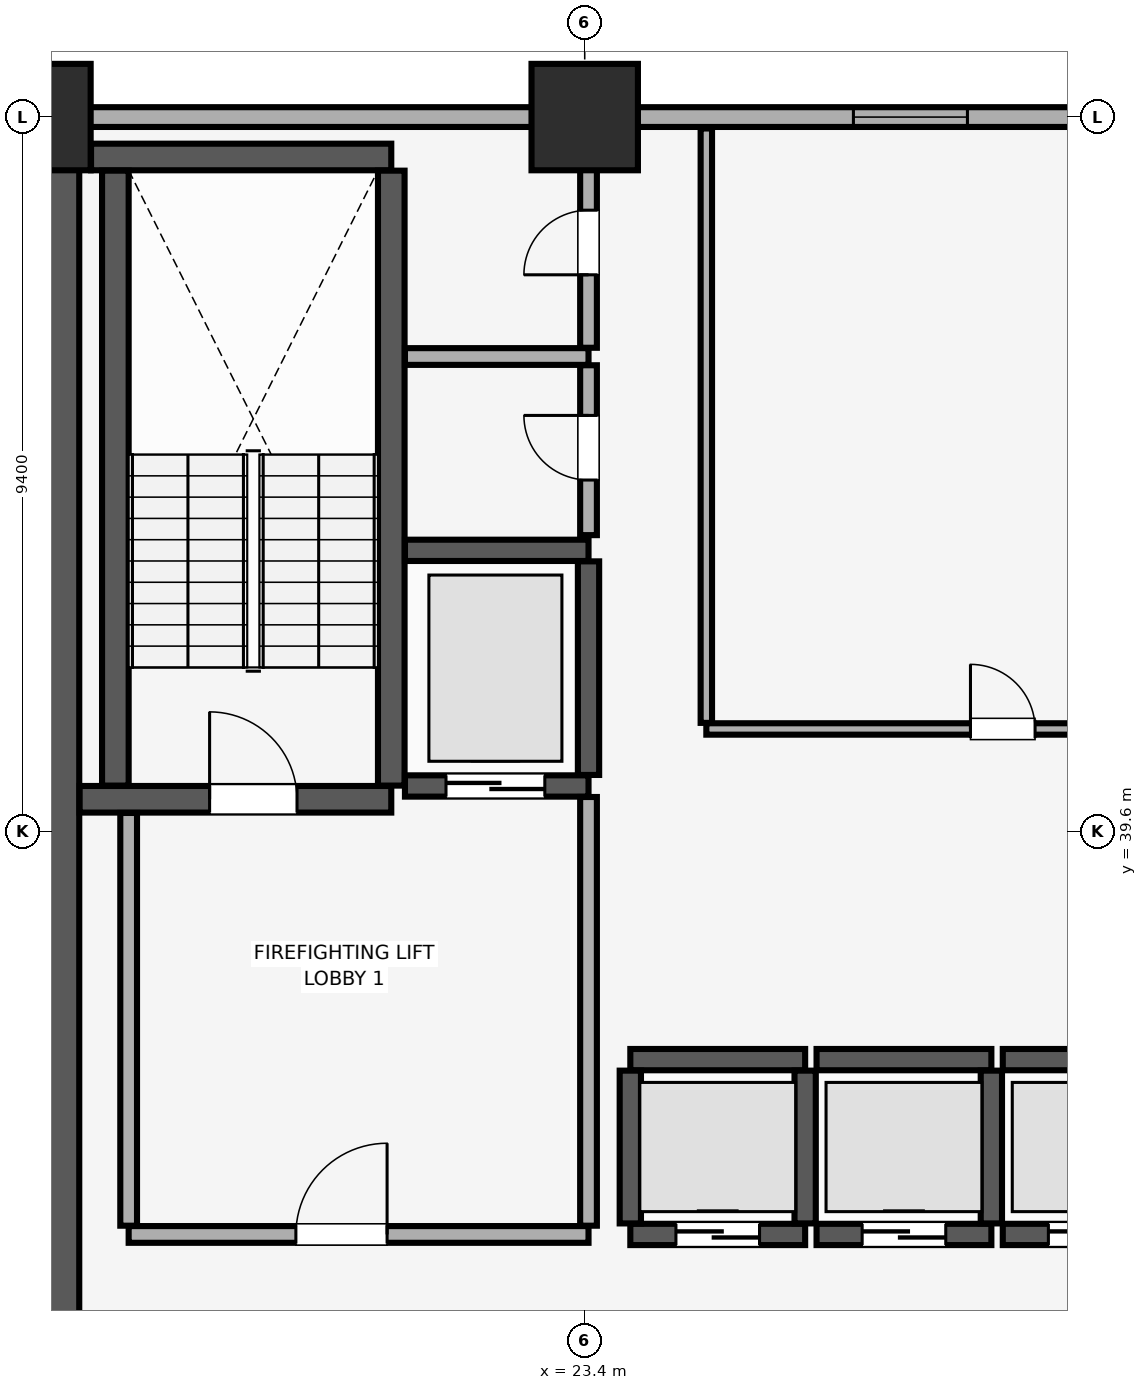
"""IFC4 building model, lengths in metres.
Left out: names, types, materials, properties, quantities, classifications, styles, units other than length and angle.
Written with IfcOpenShell. Run it as: python <this file> out.ifc"""

import sys

from ifc_helpers import new_model, si_unit, direction, frame, frame_2d, origin, origin_2d, place, context, subcontext, project, spatial, rectangle, extrude, element, fill, save


model = new_model("IFC4")
c1 = context("Model", 3, precision=1e-05, world=origin(), true_north=direction((0.0, 1.0)))
c2 = subcontext(c1, "Body", "Model", "MODEL_VIEW")
j1 = project(units=[si_unit("LENGTHUNIT", "METRE"), si_unit("PLANEANGLEUNIT", "RADIAN")], contexts=[c1])
p1 = place(None, origin())
s1 = spatial("IfcSite", under=j1, at=p1, CompositionType="ELEMENT")
p2 = place(p1, origin())
s2 = spatial("IfcBuilding", under=s1, at=p2, CompositionType="ELEMENT")
p3 = place(p2, frame((0.0, 0.0, 72.65)))
s3 = spatial("IfcBuildingStorey", under=s2, at=p3, CompositionType="ELEMENT", Elevation=72.65)
for number, where, z_axis, x_axis in (
    (1, (16.2, 49.0, 0.0), (0.0, 0.0, 1.0), (1.0, 0.0, 0.0)),
    (2, (23.4, 49.0, 0.0), (0.0, 0.0, 1.0), (1.0, 0.0, 0.0)),
):
    element("IfcColumn", number, at=place(p3, frame(where, z_axis=z_axis, x_axis=x_axis)), inside=s3, PredefinedType="COLUMN", context=c2, shape_type="SweptSolid", body=[
        extrude(rectangle(XDim=1.4, YDim=1.4, at=origin_2d()), origin(), (0.0, 0.0, 1.0), 3.51),
    ])
p4 = place(p3, frame((79.8, 49.0, 0.0), z_axis=(0.0, 0.0, 1.0), x_axis=(-1.0, 0.0, 0.0)))
e3 = element("IfcWall", 3, at=p4, inside=s3, PredefinedType="SOLIDWALL", context=c2, shape_type="SweptSolid", body=[
    extrude(rectangle(XDim=75.6, YDim=0.26, at=frame_2d((37.8, 0.0))), origin(), (0.0, 0.0, 1.0), 2.56),
])
p5 = place(p4, frame((72.565, 0.0, 0.85)))
e4 = element("IfcOpeningElement", 4, at=p5, cuts=e3, PredefinedType="OPENING", context=c2, shape_type="SweptSolid", body=[
    extrude(rectangle(XDim=1.5, YDim=1.4, at=frame_2d((0.75, 0.7))), frame((0.0, 0.14, 0.0), z_axis=(0.0, -1.0, 0.0), x_axis=(1.0, 0.0, 0.0)), (0.0, 0.0, 1.0), 0.28),
])
p6 = place(p4, frame((67.45, 0.0, 0.85)))
e5 = element("IfcOpeningElement", 5, at=p6, cuts=e3, PredefinedType="OPENING", context=c2, shape_type="SweptSolid", body=[
    extrude(rectangle(XDim=1.5, YDim=1.4, at=frame_2d((0.75, 0.7))), frame((0.0, 0.14, 0.0), z_axis=(0.0, -1.0, 0.0), x_axis=(1.0, 0.0, 0.0)), (0.0, 0.0, 1.0), 0.28),
])
p7 = place(p4, frame((6.65, 0.0, 0.85)))
e6 = element("IfcOpeningElement", 6, at=p7, cuts=e3, PredefinedType="OPENING", context=c2, shape_type="SweptSolid", body=[
    extrude(rectangle(XDim=1.5, YDim=1.4, at=frame_2d((0.75, 0.7))), frame((0.0, 0.14, 0.0), z_axis=(0.0, -1.0, 0.0), x_axis=(1.0, 0.0, 0.0)), (0.0, 0.0, 1.0), 0.28),
])
p8 = place(p4, frame((1.535, 0.0, 0.85)))
e7 = element("IfcOpeningElement", 7, at=p8, cuts=e3, PredefinedType="OPENING", context=c2, shape_type="SweptSolid", body=[
    extrude(rectangle(XDim=1.5, YDim=1.4, at=frame_2d((0.75, 0.7))), frame((0.0, 0.14, 0.0), z_axis=(0.0, -1.0, 0.0), x_axis=(1.0, 0.0, 0.0)), (0.0, 0.0, 1.0), 0.28),
])
p9 = place(p4, frame((51.365, 0.0, 0.9)))
e8 = element("IfcOpeningElement", 8, at=p9, cuts=e3, PredefinedType="OPENING", context=c2, shape_type="SweptSolid", body=[
    extrude(rectangle(XDim=1.5, YDim=1.4, at=frame_2d((0.75, 0.7))), frame((0.0, 0.14, 0.0), z_axis=(0.0, -1.0, 0.0), x_axis=(1.0, 0.0, 0.0)), (0.0, 0.0, 1.0), 0.28),
])
p10 = place(p4, frame((44.55, 0.0, 0.9)))
e9 = element("IfcOpeningElement", 9, at=p10, cuts=e3, PredefinedType="OPENING", context=c2, shape_type="SweptSolid", body=[
    extrude(rectangle(XDim=1.5, YDim=1.4, at=frame_2d((0.75, 0.7))), frame((0.0, 0.14, 0.0), z_axis=(0.0, -1.0, 0.0), x_axis=(1.0, 0.0, 0.0)), (0.0, 0.0, 1.0), 0.28),
])
p11 = place(p4, frame((28.1, 0.0, 0.9)))
e10 = element("IfcOpeningElement", 10, at=p11, cuts=e3, PredefinedType="OPENING", context=c2, shape_type="SweptSolid", body=[
    extrude(rectangle(XDim=1.5, YDim=1.4, at=frame_2d((0.75, 0.7))), frame((0.0, 0.14, 0.0), z_axis=(0.0, -1.0, 0.0), x_axis=(1.0, 0.0, 0.0)), (0.0, 0.0, 1.0), 0.28),
])
p12 = place(p4, frame((23.485, 0.0, 0.9)))
e11 = element("IfcOpeningElement", 11, at=p12, cuts=e3, PredefinedType="OPENING", context=c2, shape_type="SweptSolid", body=[
    extrude(rectangle(XDim=1.5, YDim=1.4, at=frame_2d((0.75, 0.7))), frame((0.0, 0.14, 0.0), z_axis=(0.0, -1.0, 0.0), x_axis=(1.0, 0.0, 0.0)), (0.0, 0.0, 1.0), 0.28),
])
p13 = place(p3, frame((16.2, 29.4, 0.0), z_axis=(0.0, 0.0, 1.0), x_axis=(0.0, 1.0, 0.0)))
e12 = element("IfcWall", 12, at=p13, inside=s3, PredefinedType="SHEAR", context=c2, shape_type="SweptSolid", body=[
    extrude(rectangle(XDim=19.2, YDim=1.1, at=frame_2d((9.6, 0.0))), origin(), (0.0, 0.0, 1.0), 3.51),
])
p14 = place(p3, frame((16.755, 40.025, 0.0), z_axis=(0.0, 0.0, 1.0), x_axis=(1.0, 0.0, 0.0)))
e13 = element("IfcWall", 13, at=p14, inside=s3, PredefinedType="SHEAR", context=c2, shape_type="SweptSolid", body=[
    extrude(rectangle(XDim=4.1, YDim=0.35, at=frame_2d((2.05, 0.0))), origin(), (0.0, 0.0, 1.0), 3.51),
])
p15 = place(p14, frame((1.71, 0.0, 0.0)))
e14 = element("IfcOpeningElement", 14, at=p15, cuts=e13, PredefinedType="OPENING", context=c2, shape_type="SweptSolid", body=[
    extrude(rectangle(XDim=1.15, YDim=2.15, at=frame_2d((0.575, 1.075))), frame((0.0, 0.185, 0.0), z_axis=(0.0, -1.0, 0.0), x_axis=(1.0, 0.0, 0.0)), (0.0, 0.0, 1.0), 0.37),
])
p16 = place(p3, frame((16.905, 48.475, 0.0), z_axis=(0.0, 0.0, 1.0), x_axis=(1.0, 0.0, 0.0)))
e15 = element("IfcWall", 15, at=p16, inside=s3, PredefinedType="SHEAR", context=c2, shape_type="SweptSolid", body=[
    extrude(rectangle(XDim=3.95, YDim=0.35, at=frame_2d((1.975, 0.0))), origin(), (0.0, 0.0, 1.0), 3.51),
])
for number, where, z_axis, x_axis in (
    (16, (17.225, 40.205, 0.0), (0.0, 0.0, 1.0), (0.0, 1.0, 0.0)),
    (17, (20.855, 40.205, 0.0), (0.0, 0.0, 1.0), (0.0, 1.0, 0.0)),
):
    element("IfcWall", number, at=place(p3, frame(where, z_axis=z_axis, x_axis=x_axis)), inside=s3, PredefinedType="SHEAR", context=c2, shape_type="SweptSolid", body=[
        extrude(rectangle(XDim=8.09, YDim=0.35, at=frame_2d((4.045, 0.0))), origin(), (0.0, 0.0, 1.0), 3.51),
    ])
p17 = place(p3, frame((24.0, 34.3, 0.0), z_axis=(0.0, 0.0, 1.0), x_axis=(1.0, 0.0, 0.0)))
e18 = element("IfcWall", 18, at=p17, inside=s3, PredefinedType="SHEAR", context=c2, shape_type="SweptSolid", body=[
    extrude(rectangle(XDim=2.3, YDim=0.28, at=frame_2d((1.15, 0.0))), origin(), (0.0, 0.0, 1.0), 3.51),
])
p18 = place(p17, frame((0.6, 0.0, 0.0)))
e19 = element("IfcOpeningElement", 19, at=p18, cuts=e18, PredefinedType="OPENING", context=c2, shape_type="SweptSolid", body=[
    extrude(rectangle(XDim=1.1, YDim=2.2, at=frame_2d((0.55, 1.1))), frame((0.0, 0.15, 0.0), z_axis=(0.0, -1.0, 0.0), x_axis=(1.0, 0.0, 0.0)), (0.0, 0.0, 1.0), 0.3),
])
p19 = place(p3, frame((24.0, 36.6, 0.0), z_axis=(0.0, 0.0, 1.0), x_axis=(1.0, 0.0, 0.0)))
e20 = element("IfcWall", 20, at=p19, inside=s3, PredefinedType="SHEAR", context=c2, shape_type="SweptSolid", body=[
    extrude(rectangle(XDim=2.3, YDim=0.28, at=frame_2d((1.15, 0.0))), origin(), (0.0, 0.0, 1.0), 3.51),
])
for number, where, z_axis, x_axis in (
    (21, (24.0, 34.445, 0.0), (0.0, 0.0, 1.0), (0.0, 1.0, 0.0)),
    (22, (26.3, 34.445, 0.0), (0.0, 0.0, 1.0), (0.0, 1.0, 0.0)),
):
    element("IfcWall", number, at=place(p3, frame(where, z_axis=z_axis, x_axis=x_axis)), inside=s3, PredefinedType="SHEAR", context=c2, shape_type="SweptSolid", body=[
        extrude(rectangle(XDim=2.01, YDim=0.28, at=frame_2d((1.005, 0.0))), origin(), (0.0, 0.0, 1.0), 3.51),
    ])
p20 = place(p3, frame((26.45, 34.3, 0.0), z_axis=(0.0, 0.0, 1.0), x_axis=(1.0, 0.0, 0.0)))
e23 = element("IfcWall", 23, at=p20, inside=s3, PredefinedType="SHEAR", context=c2, shape_type="SweptSolid", body=[
    extrude(rectangle(XDim=2.3, YDim=0.28, at=frame_2d((1.15, 0.0))), origin(), (0.0, 0.0, 1.0), 3.51),
])
p21 = place(p20, frame((0.6, 0.0, 0.0)))
e24 = element("IfcOpeningElement", 24, at=p21, cuts=e23, PredefinedType="OPENING", context=c2, shape_type="SweptSolid", body=[
    extrude(rectangle(XDim=1.1, YDim=2.2, at=frame_2d((0.55, 1.1))), frame((0.0, 0.15, 0.0), z_axis=(0.0, -1.0, 0.0), x_axis=(1.0, 0.0, 0.0)), (0.0, 0.0, 1.0), 0.3),
])
p22 = place(p3, frame((26.45, 36.6, 0.0), z_axis=(0.0, 0.0, 1.0), x_axis=(1.0, 0.0, 0.0)))
e25 = element("IfcWall", 25, at=p22, inside=s3, PredefinedType="SHEAR", context=c2, shape_type="SweptSolid", body=[
    extrude(rectangle(XDim=2.3, YDim=0.28, at=frame_2d((1.15, 0.0))), origin(), (0.0, 0.0, 1.0), 3.51),
])
p23 = place(p3, frame((28.75, 34.445, 0.0), z_axis=(0.0, 0.0, 1.0), x_axis=(0.0, 1.0, 0.0)))
e26 = element("IfcWall", 26, at=p23, inside=s3, PredefinedType="SHEAR", context=c2, shape_type="SweptSolid", body=[
    extrude(rectangle(XDim=2.01, YDim=0.28, at=frame_2d((1.005, 0.0))), origin(), (0.0, 0.0, 1.0), 3.51),
])
p24 = place(p3, frame((28.9, 34.3, 0.0), z_axis=(0.0, 0.0, 1.0), x_axis=(1.0, 0.0, 0.0)))
e27 = element("IfcWall", 27, at=p24, inside=s3, PredefinedType="SHEAR", context=c2, shape_type="SweptSolid", body=[
    extrude(rectangle(XDim=2.3, YDim=0.28, at=frame_2d((1.15, 0.0))), origin(), (0.0, 0.0, 1.0), 3.51),
])
p25 = place(p24, frame((0.6, 0.0, 0.0)))
e28 = element("IfcOpeningElement", 28, at=p25, cuts=e27, PredefinedType="OPENING", context=c2, shape_type="SweptSolid", body=[
    extrude(rectangle(XDim=1.1, YDim=2.2, at=frame_2d((0.55, 1.1))), frame((0.0, 0.15, 0.0), z_axis=(0.0, -1.0, 0.0), x_axis=(1.0, 0.0, 0.0)), (0.0, 0.0, 1.0), 0.3),
])
p26 = place(p3, frame((28.9, 36.6, 0.0), z_axis=(0.0, 0.0, 1.0), x_axis=(1.0, 0.0, 0.0)))
e29 = element("IfcWall", 29, at=p26, inside=s3, PredefinedType="SHEAR", context=c2, shape_type="SweptSolid", body=[
    extrude(rectangle(XDim=2.3, YDim=0.28, at=frame_2d((1.15, 0.0))), origin(), (0.0, 0.0, 1.0), 3.51),
])
p27 = place(p3, frame((21.035, 40.2, 0.0), z_axis=(0.0, 0.0, 1.0), x_axis=(1.0, 0.0, 0.0)))
e30 = element("IfcWall", 30, at=p27, inside=s3, PredefinedType="SHEAR", context=c2, shape_type="SweptSolid", body=[
    extrude(rectangle(XDim=2.415, YDim=0.28, at=frame_2d((1.208, 0.0))), origin(), (0.0, 0.0, 1.0), 3.51),
])
p28 = place(p27, frame((0.54, 0.0, 0.0)))
e31 = element("IfcOpeningElement", 31, at=p28, cuts=e30, PredefinedType="OPENING", context=c2, shape_type="SweptSolid", body=[
    extrude(rectangle(XDim=1.3, YDim=2.3, at=frame_2d((0.65, 1.15))), frame((0.0, 0.15, 0.0), z_axis=(0.0, -1.0, 0.0), x_axis=(1.0, 0.0, 0.0)), (0.0, 0.0, 1.0), 0.3),
])
p29 = place(p3, frame((21.035, 43.3, 0.0), z_axis=(0.0, 0.0, 1.0), x_axis=(1.0, 0.0, 0.0)))
e32 = element("IfcWall", 32, at=p29, inside=s3, PredefinedType="SHEAR", context=c2, shape_type="SweptSolid", body=[
    extrude(rectangle(XDim=2.415, YDim=0.28, at=frame_2d((1.208, 0.0))), origin(), (0.0, 0.0, 1.0), 3.51),
])
p30 = place(p3, frame((23.45, 40.345, 0.0), z_axis=(0.0, 0.0, 1.0), x_axis=(0.0, 1.0, 0.0)))
e33 = element("IfcWall", 33, at=p30, inside=s3, PredefinedType="SHEAR", context=c2, shape_type="SweptSolid", body=[
    extrude(rectangle(XDim=2.81, YDim=0.28, at=frame_2d((1.405, 0.0))), origin(), (0.0, 0.0, 1.0), 3.51),
])
p31 = place(p3, frame((17.4, 34.3, 0.0), z_axis=(0.0, 0.0, 1.0), x_axis=(1.0, 0.0, 0.0)))
e34 = element("IfcWall", 34, at=p31, inside=s3, PredefinedType="PARTITIONING", context=c2, shape_type="SweptSolid", body=[
    extrude(rectangle(XDim=6.05, YDim=0.22, at=frame_2d((3.025, 0.0))), origin(), (0.0, 0.0, 1.0), 3.51),
])
p32 = place(p31, frame((2.2, 0.0, 0.0)))
e35 = element("IfcOpeningElement", 35, at=p32, cuts=e34, PredefinedType="OPENING", context=c2, shape_type="SweptSolid", body=[
    extrude(rectangle(XDim=1.2, YDim=2.15, at=frame_2d((0.6, 1.075))), frame((0.0, 0.12, 0.0), z_axis=(0.0, -1.0, 0.0), x_axis=(1.0, 0.0, 0.0)), (0.0, 0.0, 1.0), 0.24),
])
p33 = place(p3, frame((17.4, 34.415, 0.0), z_axis=(0.0, 0.0, 1.0), x_axis=(0.0, 1.0, 0.0)))
e36 = element("IfcWall", 36, at=p33, inside=s3, PredefinedType="PARTITIONING", context=c2, shape_type="SweptSolid", body=[
    extrude(rectangle(XDim=5.43, YDim=0.22, at=frame_2d((2.715, 0.0))), origin(), (0.0, 0.0, 1.0), 3.51),
])
p34 = place(p3, frame((23.45, 34.415, 0.0), z_axis=(0.0, 0.0, 1.0), x_axis=(0.0, 1.0, 0.0)))
e37 = element("IfcWall", 37, at=p34, inside=s3, PredefinedType="PARTITIONING", context=c2, shape_type="SweptSolid", body=[
    extrude(rectangle(XDim=5.64, YDim=0.22, at=frame_2d((2.82, 0.0))), origin(), (0.0, 0.0, 1.0), 3.51),
])
p35 = place(p3, frame((21.035, 45.85, 0.0), z_axis=(0.0, 0.0, 1.0), x_axis=(1.0, 0.0, 0.0)))
e38 = element("IfcWall", 38, at=p35, inside=s3, PredefinedType="PARTITIONING", context=c2, shape_type="SweptSolid", body=[
    extrude(rectangle(XDim=2.415, YDim=0.22, at=frame_2d((1.208, 0.0))), origin(), (0.0, 0.0, 1.0), 3.51),
])
p36 = place(p3, frame((23.45, 43.5, 0.0), z_axis=(0.0, 0.0, 1.0), x_axis=(0.0, 1.0, 0.0)))
e39 = element("IfcWall", 39, at=p36, inside=s3, PredefinedType="PARTITIONING", context=c2, shape_type="SweptSolid", body=[
    extrude(rectangle(XDim=2.235, YDim=0.22, at=frame_2d((1.118, 0.0))), origin(), (0.0, 0.0, 1.0), 3.51),
])
p37 = place(p36, frame((0.725, 0.0, 0.0)))
e40 = element("IfcOpeningElement", 40, at=p37, cuts=e39, PredefinedType="OPENING", context=c2, shape_type="SweptSolid", body=[
    extrude(rectangle(XDim=0.85, YDim=2.1, at=frame_2d((0.425, 1.05))), frame((0.0, 0.12, 0.0), z_axis=(0.0, -1.0, 0.0), x_axis=(1.0, 0.0, 0.0)), (0.0, 0.0, 1.0), 0.24),
])
p38 = place(p3, frame((23.45, 45.965, 0.0), z_axis=(0.0, 0.0, 1.0), x_axis=(0.0, 1.0, 0.0)))
e41 = element("IfcWall", 41, at=p38, inside=s3, PredefinedType="PARTITIONING", context=c2, shape_type="SweptSolid", body=[
    extrude(rectangle(XDim=2.885, YDim=0.22, at=frame_2d((1.442, 0.0))), origin(), (0.0, 0.0, 1.0), 3.51),
])
p39 = place(p38, frame((0.96, 0.0, 0.0)))
e42 = element("IfcOpeningElement", 42, at=p39, cuts=e41, PredefinedType="OPENING", context=c2, shape_type="SweptSolid", body=[
    extrude(rectangle(XDim=0.85, YDim=2.1, at=frame_2d((0.425, 1.05))), frame((0.0, 0.12, 0.0), z_axis=(0.0, -1.0, 0.0), x_axis=(1.0, 0.0, 0.0)), (0.0, 0.0, 1.0), 0.24),
])
p40 = place(p3, frame((25.0, 40.95, 0.0), z_axis=(0.0, 0.0, 1.0), x_axis=(1.0, 0.0, 0.0)))
e43 = element("IfcWall", 43, at=p40, inside=s3, PredefinedType="PARTITIONING", context=c2, shape_type="SweptSolid", body=[
    extrude(rectangle(XDim=7.8, YDim=0.15, at=frame_2d((3.9, 0.0))), origin(), (0.0, 0.0, 1.0), 3.51),
])
p41 = place(p40, frame((3.475, 0.0, 0.0)))
e44 = element("IfcOpeningElement", 44, at=p41, cuts=e43, PredefinedType="OPENING", context=c2, shape_type="SweptSolid", body=[
    extrude(rectangle(XDim=0.85, YDim=2.1, at=frame_2d((0.425, 1.05))), frame((0.0, 0.085, 0.0), z_axis=(0.0, -1.0, 0.0), x_axis=(1.0, 0.0, 0.0)), (0.0, 0.0, 1.0), 0.17),
])
p42 = place(p3, frame((25.0, 41.03, 0.0), z_axis=(0.0, 0.0, 1.0), x_axis=(0.0, 1.0, 0.0)))
e45 = element("IfcWall", 45, at=p42, inside=s3, PredefinedType="PARTITIONING", context=c2, shape_type="SweptSolid", body=[
    extrude(rectangle(XDim=7.82, YDim=0.15, at=frame_2d((3.91, 0.0))), origin(), (0.0, 0.0, 1.0), 3.51),
])
p43 = place(p9, origin())
e46 = element("IfcWindow", 46, at=p43, inside=s3, PartitioningType="SINGLE_PANEL", PredefinedType="WINDOW", context=c2, shape_type="SweptSolid", body=[
    extrude(rectangle(XDim=1.5, YDim=1.4, at=frame_2d((0.75, 0.7))), frame((0.0, 0.03, 0.0), z_axis=(0.0, -1.0, 0.0), x_axis=(1.0, 0.0, 0.0)), (0.0, 0.0, 1.0), 0.06),
])
fill(e8, e46)
p44 = place(p15, origin())
e47 = element("IfcDoor", 47, at=p44, inside=s3, OperationType="SINGLE_SWING_LEFT", PredefinedType="DOOR", context=c2, shape_type="SweptSolid", body=[
    extrude(rectangle(XDim=1.15, YDim=2.15, at=frame_2d((0.575, 1.075))), frame((0.0, 0.025, 0.0), z_axis=(0.0, -1.0, 0.0), x_axis=(1.0, 0.0, 0.0)), (0.0, 0.0, 1.0), 0.05),
])
fill(e14, e47)
p45 = place(p18, origin())
e48 = element("IfcDoor", 48, at=p45, inside=s3, OperationType="DOUBLE_DOOR_SLIDING", PredefinedType="DOOR", context=c2, shape_type="SweptSolid", body=[
    extrude(rectangle(XDim=1.1, YDim=2.2, at=frame_2d((0.55, 1.1))), frame((0.0, 0.025, 0.0), z_axis=(0.0, -1.0, 0.0), x_axis=(1.0, 0.0, 0.0)), (0.0, 0.0, 1.0), 0.05),
])
fill(e19, e48)
p46 = place(p21, origin())
e49 = element("IfcDoor", 49, at=p46, inside=s3, OperationType="DOUBLE_DOOR_SLIDING", PredefinedType="DOOR", context=c2, shape_type="SweptSolid", body=[
    extrude(rectangle(XDim=1.1, YDim=2.2, at=frame_2d((0.55, 1.1))), frame((0.0, 0.025, 0.0), z_axis=(0.0, -1.0, 0.0), x_axis=(1.0, 0.0, 0.0)), (0.0, 0.0, 1.0), 0.05),
])
fill(e24, e49)
p47 = place(p25, origin())
e50 = element("IfcDoor", 50, at=p47, inside=s3, OperationType="DOUBLE_DOOR_SLIDING", PredefinedType="DOOR", context=c2, shape_type="SweptSolid", body=[
    extrude(rectangle(XDim=1.1, YDim=2.2, at=frame_2d((0.55, 1.1))), frame((0.0, 0.025, 0.0), z_axis=(0.0, -1.0, 0.0), x_axis=(1.0, 0.0, 0.0)), (0.0, 0.0, 1.0), 0.05),
])
fill(e28, e50)
p48 = place(p28, origin())
e51 = element("IfcDoor", 51, at=p48, inside=s3, OperationType="DOUBLE_DOOR_SLIDING", PredefinedType="DOOR", context=c2, shape_type="SweptSolid", body=[
    extrude(rectangle(XDim=1.3, YDim=2.3, at=frame_2d((0.65, 1.15))), frame((0.0, 0.025, 0.0), z_axis=(0.0, -1.0, 0.0), x_axis=(1.0, 0.0, 0.0)), (0.0, 0.0, 1.0), 0.05),
])
fill(e31, e51)
p49 = place(p32, origin())
e52 = element("IfcDoor", 52, at=p49, inside=s3, OperationType="SINGLE_SWING_RIGHT", PredefinedType="DOOR", context=c2, shape_type="SweptSolid", body=[
    extrude(rectangle(XDim=1.2, YDim=2.15, at=frame_2d((0.6, 1.075))), frame((0.0, 0.025, 0.0), z_axis=(0.0, -1.0, 0.0), x_axis=(1.0, 0.0, 0.0)), (0.0, 0.0, 1.0), 0.05),
])
fill(e35, e52)
p50 = place(p37, origin())
e53 = element("IfcDoor", 53, at=p50, inside=s3, OperationType="SINGLE_SWING_RIGHT", PredefinedType="DOOR", context=c2, shape_type="SweptSolid", body=[
    extrude(rectangle(XDim=0.85, YDim=2.1, at=frame_2d((0.425, 1.05))), frame((0.0, 0.025, 0.0), z_axis=(0.0, -1.0, 0.0), x_axis=(1.0, 0.0, 0.0)), (0.0, 0.0, 1.0), 0.05),
])
fill(e40, e53)
p51 = place(p39, origin())
e54 = element("IfcDoor", 54, at=p51, inside=s3, OperationType="SINGLE_SWING_LEFT", PredefinedType="DOOR", context=c2, shape_type="SweptSolid", body=[
    extrude(rectangle(XDim=0.85, YDim=2.1, at=frame_2d((0.425, 1.05))), frame((0.0, 0.025, 0.0), z_axis=(0.0, -1.0, 0.0), x_axis=(1.0, 0.0, 0.0)), (0.0, 0.0, 1.0), 0.05),
])
fill(e42, e54)
p52 = place(p41, origin())
e55 = element("IfcDoor", 55, at=p52, inside=s3, OperationType="SINGLE_SWING_LEFT", PredefinedType="DOOR", context=c2, shape_type="SweptSolid", body=[
    extrude(rectangle(XDim=0.85, YDim=2.1, at=frame_2d((0.425, 1.05))), frame((0.0, 0.025, 0.0), z_axis=(0.0, -1.0, 0.0), x_axis=(1.0, 0.0, 0.0)), (0.0, 0.0, 1.0), 0.05),
])
fill(e44, e55)
save(model, sys.argv[1])
